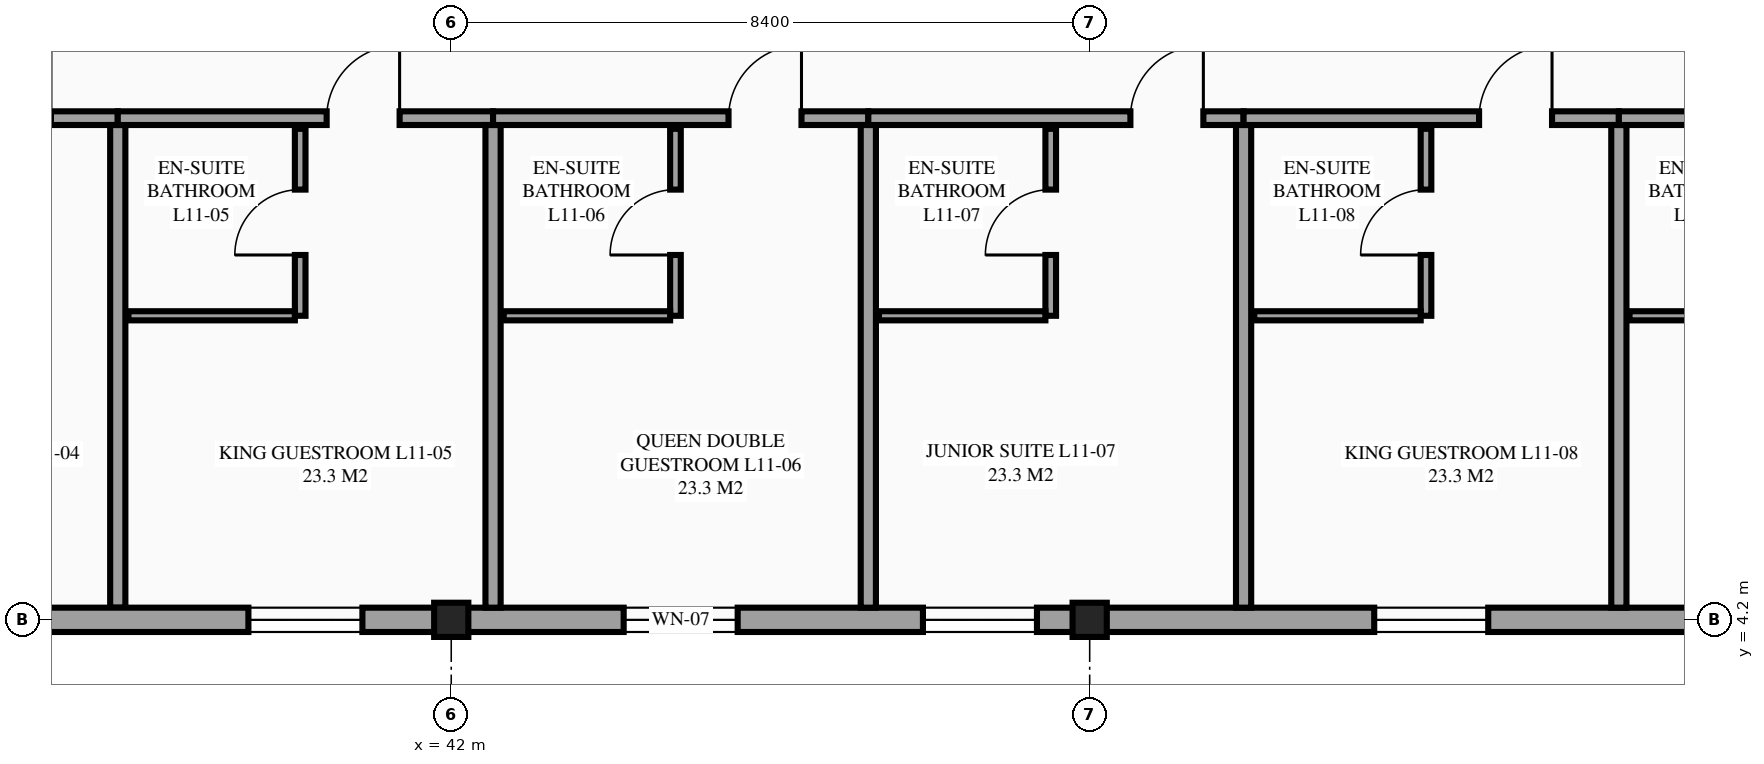
"""IFC4 building model, lengths in metres.
Left out: names, types, materials, properties, quantities, classifications, styles, units other than length and angle.
Written with IfcOpenShell. Run it as: python <this file> out.ifc"""

import sys

from ifc_helpers import new_model, si_unit, direction, frame, frame_2d, origin, origin_2d, place, context, subcontext, project, spatial, rectangle, extrude, element, fill, save


model = new_model("IFC4")
c1 = context("Model", 3, precision=1e-05, world=origin(), true_north=direction((0.0, 1.0)))
c2 = subcontext(c1, "Body", "Model", "MODEL_VIEW")
j1 = project(units=[si_unit("LENGTHUNIT", "METRE"), si_unit("PLANEANGLEUNIT", "RADIAN")], contexts=[c1])
p1 = place(None, origin())
s1 = spatial("IfcSite", under=j1, at=p1, CompositionType="ELEMENT")
p2 = place(p1, origin())
s2 = spatial("IfcBuilding", under=s1, at=p2, CompositionType="ELEMENT")
p3 = place(p2, frame((0.0, 0.0, 43.5)))
s3 = spatial("IfcBuildingStorey", under=s2, at=p3, CompositionType="ELEMENT", Elevation=43.5)
for number, where, z_axis, x_axis in (
    (1, (42.0, 4.2, 0.0), (0.0, 0.0, 1.0), (1.0, 0.0, 0.0)),
    (2, (50.4, 4.2, 0.0), (0.0, 0.0, 1.0), (1.0, 0.0, 0.0)),
):
    element("IfcColumn", number, at=place(p3, frame(where, z_axis=z_axis, x_axis=x_axis)), inside=s3, PredefinedType="COLUMN", context=c2, shape_type="SweptSolid", body=[
        extrude(rectangle(XDim=0.45, YDim=0.45, at=origin_2d()), origin(), (0.0, 0.0, 1.0), 3.6),
    ])
p4 = place(p3, frame((42.0, 4.2, 0.0), z_axis=(0.0, 0.0, 1.0), x_axis=(1.0, 0.0, 0.0)))
e3 = element("IfcWall", 3, at=p4, inside=s3, PredefinedType="STANDARD", context=c2, shape_type="SweptSolid", body=[
    extrude(rectangle(XDim=16.8, YDim=0.32, at=frame_2d((8.4, 0.0))), origin(), (0.0, 0.0, 1.0), 2.51),
])
p5 = place(p4, frame((2.269, 0.0, 0.85)))
e4 = element("IfcOpeningElement", 4, at=p5, cuts=e3, PredefinedType="OPENING", context=c2, shape_type="SweptSolid", body=[
    extrude(rectangle(XDim=1.5, YDim=1.5, at=frame_2d((0.75, 0.75))), frame((0.0, 0.17, 0.0), z_axis=(0.0, -1.0, 0.0), x_axis=(1.0, 0.0, 0.0)), (0.0, 0.0, 1.0), 0.34),
])
p6 = place(p4, frame((6.206, 0.0, 0.85)))
e5 = element("IfcOpeningElement", 5, at=p6, cuts=e3, PredefinedType="OPENING", context=c2, shape_type="SweptSolid", body=[
    extrude(rectangle(XDim=1.5, YDim=1.5, at=frame_2d((0.75, 0.75))), frame((0.0, 0.17, 0.0), z_axis=(0.0, -1.0, 0.0), x_axis=(1.0, 0.0, 0.0)), (0.0, 0.0, 1.0), 0.34),
])
p7 = place(p4, frame((12.144, 0.0, 0.85)))
e6 = element("IfcOpeningElement", 6, at=p7, cuts=e3, PredefinedType="OPENING", context=c2, shape_type="SweptSolid", body=[
    extrude(rectangle(XDim=1.5, YDim=1.5, at=frame_2d((0.75, 0.75))), frame((0.0, 0.17, 0.0), z_axis=(0.0, -1.0, 0.0), x_axis=(1.0, 0.0, 0.0)), (0.0, 0.0, 1.0), 0.34),
])
p8 = place(p3, frame((32.675, 10.8, 0.0), z_axis=(0.0, 0.0, 1.0), x_axis=(1.0, 0.0, 0.0)))
e7 = element("IfcWall", 7, at=p8, inside=s3, PredefinedType="PARTITIONING", context=c2, shape_type="SweptSolid", body=[
    extrude(rectangle(XDim=4.938, YDim=0.18, at=frame_2d((2.469, 0.0))), origin(), (0.0, 0.0, 1.0), 3.355),
])
p9 = place(p8, frame((3.098, 0.0, 0.0)))
e8 = element("IfcOpeningElement", 8, at=p9, cuts=e7, PredefinedType="OPENING", context=c2, shape_type="SweptSolid", body=[
    extrude(rectangle(XDim=0.96, YDim=2.15, at=frame_2d((0.48, 1.075))), frame((0.0, 0.1, 0.0), z_axis=(0.0, -1.0, 0.0), x_axis=(1.0, 0.0, 0.0)), (0.0, 0.0, 1.0), 0.2),
])
p10 = place(p3, frame((37.613, 4.36, 0.0), z_axis=(0.0, 0.0, 1.0), x_axis=(0.0, 1.0, 0.0)))
e9 = element("IfcWall", 9, at=p10, inside=s3, PredefinedType="PARTITIONING", context=c2, shape_type="SweptSolid", body=[
    extrude(rectangle(XDim=6.35, YDim=0.2, at=frame_2d((3.175, 0.0))), origin(), (0.0, 0.0, 1.0), 3.355),
])
p11 = place(p3, frame((37.613, 10.8, 0.0), z_axis=(0.0, 0.0, 1.0), x_axis=(1.0, 0.0, 0.0)))
e10 = element("IfcWall", 10, at=p11, inside=s3, PredefinedType="PARTITIONING", context=c2, shape_type="SweptSolid", body=[
    extrude(rectangle(XDim=4.938, YDim=0.18, at=frame_2d((2.469, 0.0))), origin(), (0.0, 0.0, 1.0), 3.355),
])
p12 = place(p11, frame((2.748, 0.0, 0.0)))
e11 = element("IfcOpeningElement", 11, at=p12, cuts=e10, PredefinedType="OPENING", context=c2, shape_type="SweptSolid", body=[
    extrude(rectangle(XDim=0.96, YDim=2.15, at=frame_2d((0.48, 1.075))), frame((0.0, 0.1, 0.0), z_axis=(0.0, -1.0, 0.0), x_axis=(1.0, 0.0, 0.0)), (0.0, 0.0, 1.0), 0.2),
])
p13 = place(p3, frame((42.55, 4.36, 0.0), z_axis=(0.0, 0.0, 1.0), x_axis=(0.0, 1.0, 0.0)))
e12 = element("IfcWall", 12, at=p13, inside=s3, PredefinedType="PARTITIONING", context=c2, shape_type="SweptSolid", body=[
    extrude(rectangle(XDim=6.35, YDim=0.2, at=frame_2d((3.175, 0.0))), origin(), (0.0, 0.0, 1.0), 3.355),
])
p14 = place(p3, frame((40.012, 8.2, 0.0), z_axis=(0.0, 0.0, 1.0), x_axis=(0.0, 1.0, 0.0)))
e13 = element("IfcWall", 13, at=p14, inside=s3, PredefinedType="PARTITIONING", context=c2, shape_type="SweptSolid", body=[
    extrude(rectangle(XDim=2.46, YDim=0.14, at=frame_2d((1.23, 0.0))), origin(), (0.0, 0.0, 1.0), 3.355),
])
p15 = place(p14, frame((0.8, 0.0, 0.0)))
e14 = element("IfcOpeningElement", 14, at=p15, cuts=e13, PredefinedType="OPENING", context=c2, shape_type="SweptSolid", body=[
    extrude(rectangle(XDim=0.86, YDim=2.1, at=frame_2d((0.43, 1.05))), frame((0.0, 0.08, 0.0), z_axis=(0.0, -1.0, 0.0), x_axis=(1.0, 0.0, 0.0)), (0.0, 0.0, 1.0), 0.16),
])
p16 = place(p3, frame((37.752, 8.2, 0.0), z_axis=(0.0, 0.0, 1.0), x_axis=(1.0, 0.0, 0.0)))
e15 = element("IfcWall", 15, at=p16, inside=s3, PredefinedType="PARTITIONING", context=c2, shape_type="SweptSolid", body=[
    extrude(rectangle(XDim=2.19, YDim=0.12, at=frame_2d((1.095, 0.0))), origin(), (0.0, 0.0, 1.0), 3.355),
])
p17 = place(p3, frame((42.55, 10.8, 0.0), z_axis=(0.0, 0.0, 1.0), x_axis=(1.0, 0.0, 0.0)))
e16 = element("IfcWall", 16, at=p17, inside=s3, PredefinedType="PARTITIONING", context=c2, shape_type="SweptSolid", body=[
    extrude(rectangle(XDim=4.938, YDim=0.18, at=frame_2d((2.469, 0.0))), origin(), (0.0, 0.0, 1.0), 3.355),
])
p18 = place(p17, frame((3.098, 0.0, 0.0)))
e17 = element("IfcOpeningElement", 17, at=p18, cuts=e16, PredefinedType="OPENING", context=c2, shape_type="SweptSolid", body=[
    extrude(rectangle(XDim=0.96, YDim=2.15, at=frame_2d((0.48, 1.075))), frame((0.0, 0.1, 0.0), z_axis=(0.0, -1.0, 0.0), x_axis=(1.0, 0.0, 0.0)), (0.0, 0.0, 1.0), 0.2),
])
p19 = place(p3, frame((47.488, 4.36, 0.0), z_axis=(0.0, 0.0, 1.0), x_axis=(0.0, 1.0, 0.0)))
e18 = element("IfcWall", 18, at=p19, inside=s3, PredefinedType="PARTITIONING", context=c2, shape_type="SweptSolid", body=[
    extrude(rectangle(XDim=6.35, YDim=0.2, at=frame_2d((3.175, 0.0))), origin(), (0.0, 0.0, 1.0), 3.355),
])
p20 = place(p3, frame((44.95, 8.2, 0.0), z_axis=(0.0, 0.0, 1.0), x_axis=(0.0, 1.0, 0.0)))
e19 = element("IfcWall", 19, at=p20, inside=s3, PredefinedType="PARTITIONING", context=c2, shape_type="SweptSolid", body=[
    extrude(rectangle(XDim=2.46, YDim=0.14, at=frame_2d((1.23, 0.0))), origin(), (0.0, 0.0, 1.0), 3.355),
])
p21 = place(p20, frame((0.8, 0.0, 0.0)))
e20 = element("IfcOpeningElement", 20, at=p21, cuts=e19, PredefinedType="OPENING", context=c2, shape_type="SweptSolid", body=[
    extrude(rectangle(XDim=0.86, YDim=2.1, at=frame_2d((0.43, 1.05))), frame((0.0, 0.08, 0.0), z_axis=(0.0, -1.0, 0.0), x_axis=(1.0, 0.0, 0.0)), (0.0, 0.0, 1.0), 0.16),
])
p22 = place(p3, frame((42.69, 8.2, 0.0), z_axis=(0.0, 0.0, 1.0), x_axis=(1.0, 0.0, 0.0)))
e21 = element("IfcWall", 21, at=p22, inside=s3, PredefinedType="PARTITIONING", context=c2, shape_type="SweptSolid", body=[
    extrude(rectangle(XDim=2.19, YDim=0.12, at=frame_2d((1.095, 0.0))), origin(), (0.0, 0.0, 1.0), 3.355),
])
p23 = place(p3, frame((47.488, 10.8, 0.0), z_axis=(0.0, 0.0, 1.0), x_axis=(1.0, 0.0, 0.0)))
e22 = element("IfcWall", 22, at=p23, inside=s3, PredefinedType="PARTITIONING", context=c2, shape_type="SweptSolid", body=[
    extrude(rectangle(XDim=4.938, YDim=0.18, at=frame_2d((2.469, 0.0))), origin(), (0.0, 0.0, 1.0), 3.355),
])
p24 = place(p23, frame((3.448, 0.0, 0.0)))
e23 = element("IfcOpeningElement", 23, at=p24, cuts=e22, PredefinedType="OPENING", context=c2, shape_type="SweptSolid", body=[
    extrude(rectangle(XDim=0.96, YDim=2.15, at=frame_2d((0.48, 1.075))), frame((0.0, 0.1, 0.0), z_axis=(0.0, -1.0, 0.0), x_axis=(1.0, 0.0, 0.0)), (0.0, 0.0, 1.0), 0.2),
])
p25 = place(p3, frame((52.425, 4.36, 0.0), z_axis=(0.0, 0.0, 1.0), x_axis=(0.0, 1.0, 0.0)))
e24 = element("IfcWall", 24, at=p25, inside=s3, PredefinedType="PARTITIONING", context=c2, shape_type="SweptSolid", body=[
    extrude(rectangle(XDim=6.35, YDim=0.2, at=frame_2d((3.175, 0.0))), origin(), (0.0, 0.0, 1.0), 3.355),
])
p26 = place(p3, frame((49.887, 8.2, 0.0), z_axis=(0.0, 0.0, 1.0), x_axis=(0.0, 1.0, 0.0)))
e25 = element("IfcWall", 25, at=p26, inside=s3, PredefinedType="PARTITIONING", context=c2, shape_type="SweptSolid", body=[
    extrude(rectangle(XDim=2.46, YDim=0.14, at=frame_2d((1.23, 0.0))), origin(), (0.0, 0.0, 1.0), 3.355),
])
p27 = place(p26, frame((0.8, 0.0, 0.0)))
e26 = element("IfcOpeningElement", 26, at=p27, cuts=e25, PredefinedType="OPENING", context=c2, shape_type="SweptSolid", body=[
    extrude(rectangle(XDim=0.86, YDim=2.1, at=frame_2d((0.43, 1.05))), frame((0.0, 0.08, 0.0), z_axis=(0.0, -1.0, 0.0), x_axis=(1.0, 0.0, 0.0)), (0.0, 0.0, 1.0), 0.16),
])
p28 = place(p3, frame((47.627, 8.2, 0.0), z_axis=(0.0, 0.0, 1.0), x_axis=(1.0, 0.0, 0.0)))
e27 = element("IfcWall", 27, at=p28, inside=s3, PredefinedType="PARTITIONING", context=c2, shape_type="SweptSolid", body=[
    extrude(rectangle(XDim=2.19, YDim=0.12, at=frame_2d((1.095, 0.0))), origin(), (0.0, 0.0, 1.0), 3.355),
])
p29 = place(p3, frame((52.425, 10.8, 0.0), z_axis=(0.0, 0.0, 1.0), x_axis=(1.0, 0.0, 0.0)))
e28 = element("IfcWall", 28, at=p29, inside=s3, PredefinedType="PARTITIONING", context=c2, shape_type="SweptSolid", body=[
    extrude(rectangle(XDim=4.938, YDim=0.18, at=frame_2d((2.469, 0.0))), origin(), (0.0, 0.0, 1.0), 3.355),
])
p30 = place(p29, frame((3.098, 0.0, 0.0)))
e29 = element("IfcOpeningElement", 29, at=p30, cuts=e28, PredefinedType="OPENING", context=c2, shape_type="SweptSolid", body=[
    extrude(rectangle(XDim=0.96, YDim=2.15, at=frame_2d((0.48, 1.075))), frame((0.0, 0.1, 0.0), z_axis=(0.0, -1.0, 0.0), x_axis=(1.0, 0.0, 0.0)), (0.0, 0.0, 1.0), 0.2),
])
p31 = place(p3, frame((57.363, 4.36, 0.0), z_axis=(0.0, 0.0, 1.0), x_axis=(0.0, 1.0, 0.0)))
e30 = element("IfcWall", 30, at=p31, inside=s3, PredefinedType="PARTITIONING", context=c2, shape_type="SweptSolid", body=[
    extrude(rectangle(XDim=6.35, YDim=0.2, at=frame_2d((3.175, 0.0))), origin(), (0.0, 0.0, 1.0), 3.355),
])
p32 = place(p3, frame((54.825, 8.2, 0.0), z_axis=(0.0, 0.0, 1.0), x_axis=(0.0, 1.0, 0.0)))
e31 = element("IfcWall", 31, at=p32, inside=s3, PredefinedType="PARTITIONING", context=c2, shape_type="SweptSolid", body=[
    extrude(rectangle(XDim=2.46, YDim=0.14, at=frame_2d((1.23, 0.0))), origin(), (0.0, 0.0, 1.0), 3.355),
])
p33 = place(p32, frame((0.8, 0.0, 0.0)))
e32 = element("IfcOpeningElement", 32, at=p33, cuts=e31, PredefinedType="OPENING", context=c2, shape_type="SweptSolid", body=[
    extrude(rectangle(XDim=0.86, YDim=2.1, at=frame_2d((0.43, 1.05))), frame((0.0, 0.08, 0.0), z_axis=(0.0, -1.0, 0.0), x_axis=(1.0, 0.0, 0.0)), (0.0, 0.0, 1.0), 0.16),
])
p34 = place(p3, frame((52.565, 8.2, 0.0), z_axis=(0.0, 0.0, 1.0), x_axis=(1.0, 0.0, 0.0)))
e33 = element("IfcWall", 33, at=p34, inside=s3, PredefinedType="PARTITIONING", context=c2, shape_type="SweptSolid", body=[
    extrude(rectangle(XDim=2.19, YDim=0.12, at=frame_2d((1.095, 0.0))), origin(), (0.0, 0.0, 1.0), 3.355),
])
p35 = place(p3, frame((57.363, 10.8, 0.0), z_axis=(0.0, 0.0, 1.0), x_axis=(1.0, 0.0, 0.0)))
e34 = element("IfcWall", 34, at=p35, inside=s3, PredefinedType="PARTITIONING", context=c2, shape_type="SweptSolid", body=[
    extrude(rectangle(XDim=4.938, YDim=0.18, at=frame_2d((2.469, 0.0))), origin(), (0.0, 0.0, 1.0), 3.355),
])
p36 = place(p35, frame((3.098, 0.0, 0.0)))
e35 = element("IfcOpeningElement", 35, at=p36, cuts=e34, PredefinedType="OPENING", context=c2, shape_type="SweptSolid", body=[
    extrude(rectangle(XDim=0.96, YDim=2.15, at=frame_2d((0.48, 1.075))), frame((0.0, 0.1, 0.0), z_axis=(0.0, -1.0, 0.0), x_axis=(1.0, 0.0, 0.0)), (0.0, 0.0, 1.0), 0.2),
])
p37 = place(p3, frame((57.502, 8.2, 0.0), z_axis=(0.0, 0.0, 1.0), x_axis=(1.0, 0.0, 0.0)))
e36 = element("IfcWall", 36, at=p37, inside=s3, PredefinedType="PARTITIONING", context=c2, shape_type="SweptSolid", body=[
    extrude(rectangle(XDim=2.19, YDim=0.12, at=frame_2d((1.095, 0.0))), origin(), (0.0, 0.0, 1.0), 3.355),
])
p38 = place(p3, frame((33.6, 4.2, 0.0), z_axis=(0.0, 0.0, 1.0), x_axis=(1.0, 0.0, 0.0)))
e37 = element("IfcWall", 37, at=p38, inside=s3, PredefinedType="STANDARD", context=c2, shape_type="SweptSolid", body=[
    extrude(rectangle(XDim=8.4, YDim=0.32, at=frame_2d((4.2, 0.0))), origin(), (0.0, 0.0, 1.0), 3.113),
])
p39 = place(p38, frame((0.794, 0.0, 0.85)))
e38 = element("IfcOpeningElement", 38, at=p39, cuts=e37, PredefinedType="OPENING", context=c2, shape_type="SweptSolid", body=[
    extrude(rectangle(XDim=1.5, YDim=1.5, at=frame_2d((0.75, 0.75))), frame((0.0, 0.17, 0.0), z_axis=(0.0, -1.0, 0.0), x_axis=(1.0, 0.0, 0.0)), (0.0, 0.0, 1.0), 0.34),
])
p40 = place(p38, frame((5.731, 0.0, 0.85)))
e39 = element("IfcOpeningElement", 39, at=p40, cuts=e37, PredefinedType="OPENING", context=c2, shape_type="SweptSolid", body=[
    extrude(rectangle(XDim=1.5, YDim=1.5, at=frame_2d((0.75, 0.75))), frame((0.0, 0.17, 0.0), z_axis=(0.0, -1.0, 0.0), x_axis=(1.0, 0.0, 0.0)), (0.0, 0.0, 1.0), 0.34),
])
p41 = place(p40, origin())
e40 = element("IfcWindow", 40, at=p41, inside=s3, PartitioningType="SINGLE_PANEL", PredefinedType="WINDOW", context=c2, shape_type="SweptSolid", body=[
    extrude(rectangle(XDim=1.5, YDim=1.5, at=frame_2d((0.75, 0.75))), frame((0.0, 0.03, 0.0), z_axis=(0.0, -1.0, 0.0), x_axis=(1.0, 0.0, 0.0)), (0.0, 0.0, 1.0), 0.06),
])
fill(e39, e40)
p42 = place(p5, origin())
e41 = element("IfcWindow", 41, at=p42, inside=s3, PartitioningType="SINGLE_PANEL", PredefinedType="WINDOW", context=c2, shape_type="SweptSolid", body=[
    extrude(rectangle(XDim=1.5, YDim=1.5, at=frame_2d((0.75, 0.75))), frame((0.0, 0.03, 0.0), z_axis=(0.0, -1.0, 0.0), x_axis=(1.0, 0.0, 0.0)), (0.0, 0.0, 1.0), 0.06),
])
fill(e4, e41)
p43 = place(p6, origin())
e42 = element("IfcWindow", 42, at=p43, inside=s3, PartitioningType="SINGLE_PANEL", PredefinedType="WINDOW", context=c2, shape_type="SweptSolid", body=[
    extrude(rectangle(XDim=1.5, YDim=1.5, at=frame_2d((0.75, 0.75))), frame((0.0, 0.03, 0.0), z_axis=(0.0, -1.0, 0.0), x_axis=(1.0, 0.0, 0.0)), (0.0, 0.0, 1.0), 0.06),
])
fill(e5, e42)
p44 = place(p7, origin())
e43 = element("IfcWindow", 43, at=p44, inside=s3, PartitioningType="SINGLE_PANEL", PredefinedType="WINDOW", context=c2, shape_type="SweptSolid", body=[
    extrude(rectangle(XDim=1.5, YDim=1.5, at=frame_2d((0.75, 0.75))), frame((0.0, 0.03, 0.0), z_axis=(0.0, -1.0, 0.0), x_axis=(1.0, 0.0, 0.0)), (0.0, 0.0, 1.0), 0.06),
])
fill(e6, e43)
p45 = place(p12, origin())
e44 = element("IfcDoor", 44, at=p45, inside=s3, OperationType="SINGLE_SWING_RIGHT", PredefinedType="DOOR", context=c2, shape_type="SweptSolid", body=[
    extrude(rectangle(XDim=0.96, YDim=2.15, at=frame_2d((0.48, 1.075))), frame((0.0, 0.025, 0.0), z_axis=(0.0, -1.0, 0.0), x_axis=(1.0, 0.0, 0.0)), (0.0, 0.0, 1.0), 0.05),
])
fill(e11, e44)
p46 = place(p15, origin())
e45 = element("IfcDoor", 45, at=p46, inside=s3, OperationType="SINGLE_SWING_LEFT", PredefinedType="DOOR", context=c2, shape_type="SweptSolid", body=[
    extrude(rectangle(XDim=0.86, YDim=2.1, at=frame_2d((0.43, 1.05))), frame((0.0, 0.025, 0.0), z_axis=(0.0, -1.0, 0.0), x_axis=(1.0, 0.0, 0.0)), (0.0, 0.0, 1.0), 0.05),
])
fill(e14, e45)
p47 = place(p18, origin())
e46 = element("IfcDoor", 46, at=p47, inside=s3, OperationType="SINGLE_SWING_RIGHT", PredefinedType="DOOR", context=c2, shape_type="SweptSolid", body=[
    extrude(rectangle(XDim=0.96, YDim=2.15, at=frame_2d((0.48, 1.075))), frame((0.0, 0.025, 0.0), z_axis=(0.0, -1.0, 0.0), x_axis=(1.0, 0.0, 0.0)), (0.0, 0.0, 1.0), 0.05),
])
fill(e17, e46)
p48 = place(p21, origin())
e47 = element("IfcDoor", 47, at=p48, inside=s3, OperationType="SINGLE_SWING_LEFT", PredefinedType="DOOR", context=c2, shape_type="SweptSolid", body=[
    extrude(rectangle(XDim=0.86, YDim=2.1, at=frame_2d((0.43, 1.05))), frame((0.0, 0.025, 0.0), z_axis=(0.0, -1.0, 0.0), x_axis=(1.0, 0.0, 0.0)), (0.0, 0.0, 1.0), 0.05),
])
fill(e20, e47)
p49 = place(p24, origin())
e48 = element("IfcDoor", 48, at=p49, inside=s3, OperationType="SINGLE_SWING_RIGHT", PredefinedType="DOOR", context=c2, shape_type="SweptSolid", body=[
    extrude(rectangle(XDim=0.96, YDim=2.15, at=frame_2d((0.48, 1.075))), frame((0.0, 0.025, 0.0), z_axis=(0.0, -1.0, 0.0), x_axis=(1.0, 0.0, 0.0)), (0.0, 0.0, 1.0), 0.05),
])
fill(e23, e48)
p50 = place(p27, origin())
e49 = element("IfcDoor", 49, at=p50, inside=s3, OperationType="SINGLE_SWING_LEFT", PredefinedType="DOOR", context=c2, shape_type="SweptSolid", body=[
    extrude(rectangle(XDim=0.86, YDim=2.1, at=frame_2d((0.43, 1.05))), frame((0.0, 0.025, 0.0), z_axis=(0.0, -1.0, 0.0), x_axis=(1.0, 0.0, 0.0)), (0.0, 0.0, 1.0), 0.05),
])
fill(e26, e49)
p51 = place(p30, origin())
e50 = element("IfcDoor", 50, at=p51, inside=s3, OperationType="SINGLE_SWING_RIGHT", PredefinedType="DOOR", context=c2, shape_type="SweptSolid", body=[
    extrude(rectangle(XDim=0.96, YDim=2.15, at=frame_2d((0.48, 1.075))), frame((0.0, 0.025, 0.0), z_axis=(0.0, -1.0, 0.0), x_axis=(1.0, 0.0, 0.0)), (0.0, 0.0, 1.0), 0.05),
])
fill(e29, e50)
p52 = place(p33, origin())
e51 = element("IfcDoor", 51, at=p52, inside=s3, OperationType="SINGLE_SWING_LEFT", PredefinedType="DOOR", context=c2, shape_type="SweptSolid", body=[
    extrude(rectangle(XDim=0.86, YDim=2.1, at=frame_2d((0.43, 1.05))), frame((0.0, 0.025, 0.0), z_axis=(0.0, -1.0, 0.0), x_axis=(1.0, 0.0, 0.0)), (0.0, 0.0, 1.0), 0.05),
])
fill(e32, e51)
save(model, sys.argv[1])
